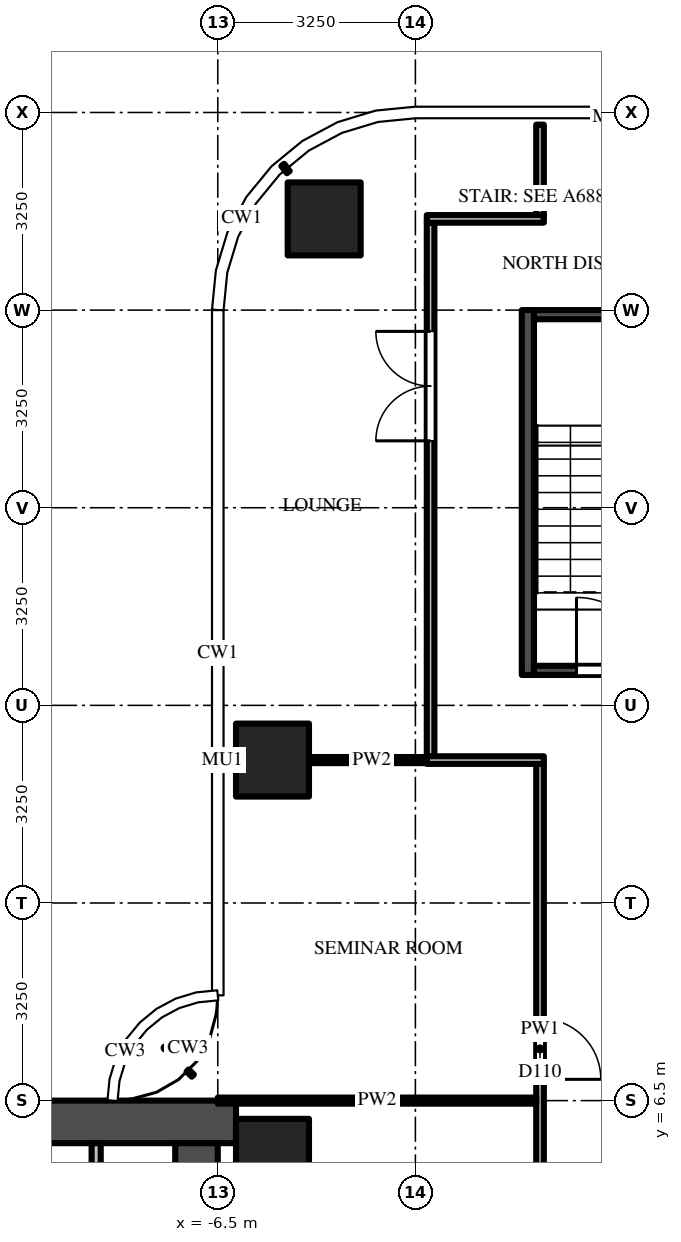
"""IFC4 building model, lengths in metres.
Left out: names, types, materials, properties, quantities, classifications, styles, units other than length and angle.
Written with IfcOpenShell. Run it as: python <this file> out.ifc"""

import sys

from ifc_helpers import new_model, si_unit, direction, frame, frame_2d, origin, origin_2d, place, context, subcontext, project, spatial, rectangle, extrude, source, transform, mapped, element, fill, save


model = new_model("IFC4")
c1 = context("Model", 3, precision=1e-05, world=origin(), true_north=direction((0.0, 1.0)))
c2 = subcontext(c1, "Body", "Model", "MODEL_VIEW")
j1 = project(units=[si_unit("LENGTHUNIT", "METRE"), si_unit("PLANEANGLEUNIT", "RADIAN")], contexts=[c1])
p1 = place(None, origin())
s1 = spatial("IfcSite", under=j1, at=p1, CompositionType="ELEMENT")
p2 = place(p1, origin())
s2 = spatial("IfcBuilding", under=s1, at=p2, CompositionType="ELEMENT")
p3 = place(p2, frame((0.0, 0.0, 197.1)))
s3 = spatial("IfcBuildingStorey", under=s2, at=p3, CompositionType="ELEMENT", Elevation=197.1)
m1 = source(origin(), c2, "Body", "SweptSolid", [
    extrude(rectangle(XDim=1.2, YDim=1.2, at=origin_2d()), origin(), (0.0, 0.0, 1.0), 3.9),
])
for number, where, z_axis, x_axis in (
    (1, (-5.6, 12.1, 0.0), (0.0, 0.0, 1.0), (1.0, 0.0, 0.0)),
    (2, (-4.75, 21.0, 0.0), (0.0, 0.0, 1.0), (1.0, 0.0, 0.0)),
    (3, (-5.6, 5.6, 0.0), (0.0, 0.0, 1.0), (1.0, 0.0, 0.0)),
):
    element("IfcColumn", number, at=place(p3, frame(where, z_axis=z_axis, x_axis=x_axis)), inside=s3, PredefinedType="COLUMN", context=c2, shape_type="MappedRepresentation", body=[
        mapped(m1, transform((0.0, 0.0, 0.0))),
    ])
m2 = source(origin(), c2, "Body", "SweptSolid", [
    extrude(rectangle(XDim=16.55, YDim=0.7, at=frame_2d((8.275, 0.0))), origin(), (0.0, 0.0, 1.0), 3.7),
])
p4 = place(p3, frame((-6.2, 6.15, 0.0), z_axis=(0.0, 0.0, 1.0), x_axis=(-1.0, 0.0, 0.0)))
e4 = element("IfcWall", 4, at=p4, inside=s3, PredefinedType="SHEAR", context=c2, shape_type="MappedRepresentation", body=[
    mapped(m2, transform((0.0, 0.0, 0.0))),
])
m3 = source(origin(), c2, "Body", "SweptSolid", [
    extrude(rectangle(XDim=9.05, YDim=0.7, at=frame_2d((4.525, 0.0))), origin(), (0.0, 0.0, 1.0), 3.7),
])
p5 = place(p3, frame((-6.85, 5.8, 0.0), z_axis=(0.0, 0.0, 1.0), x_axis=(0.0, -1.0, 0.0)))
e5 = element("IfcWall", 5, at=p5, inside=s3, PredefinedType="SHEAR", context=c2, shape_type="MappedRepresentation", body=[
    mapped(m3, transform((0.0, 0.0, 0.0))),
])
m4 = source(origin(), c2, "Body", "SweptSolid", [
    extrude(rectangle(XDim=1.8, YDim=2.1, at=frame_2d((0.9, 1.05))), frame((0.0, 0.36, 0.0), z_axis=(0.0, -1.0, 0.0), x_axis=(1.0, 0.0, 0.0)), (0.0, 0.0, 1.0), 0.72),
])
p6 = place(p5, frame((3.15, 0.0, 0.0)))
e6 = element("IfcOpeningElement", 6, at=p6, cuts=e5, PredefinedType="OPENING", context=c2, shape_type="MappedRepresentation", body=[
    mapped(m4, transform((0.0, 0.0, 0.0))),
])
m5 = source(origin(), c2, "Body", "SweptSolid", [
    extrude(rectangle(XDim=2.2, YDim=0.15, at=frame_2d((1.1, 0.0))), origin(), (0.0, 0.0, 1.0), 3.7),
])
p7 = place(p3, frame((-8.5, 5.8, 0.0), z_axis=(0.0, 0.0, 1.0), x_axis=(0.0, -1.0, 0.0)))
e7 = element("IfcWall", 7, at=p7, inside=s3, PredefinedType="PARTITIONING", context=c2, shape_type="MappedRepresentation", body=[
    mapped(m5, transform((0.0, 0.0, 0.0))),
])
m6 = source(origin(), c2, "Body", "SweptSolid", [
    extrude(rectangle(XDim=6.0, YDim=0.2, at=frame_2d((3.0, 0.0))), origin(), (0.0, 0.0, 1.0), 3.7),
])
p8 = place(p3, frame((-1.4, 13.5, 0.0), z_axis=(0.0, 0.0, 1.0), x_axis=(0.0, 1.0, 0.0)))
e8 = element("IfcWall", 8, at=p8, inside=s3, PredefinedType="SHEAR", context=c2, shape_type="MappedRepresentation", body=[
    mapped(m6, transform((0.0, 0.0, 0.0))),
])
m7 = source(origin(), c2, "Body", "SweptSolid", [
    extrude(rectangle(XDim=2.6, YDim=0.15, at=frame_2d((1.3, 0.0))), origin(), (0.0, 0.0, 1.0), 3.7),
])
p9 = place(p3, frame((-1.3, 13.575, 0.0), z_axis=(0.0, 0.0, 1.0), x_axis=(1.0, 0.0, 0.0)))
e9 = element("IfcWall", 9, at=p9, inside=s3, PredefinedType="SHEAR", context=c2, shape_type="MappedRepresentation", body=[
    mapped(m7, transform((0.0, 0.0, 0.0))),
])
m8 = source(origin(), c2, "Body", "SweptSolid", [
    extrude(rectangle(XDim=1.2, YDim=2.1, at=frame_2d((0.6, 1.05))), frame((0.0, 0.085, 0.0), z_axis=(0.0, -1.0, 0.0), x_axis=(1.0, 0.0, 0.0)), (0.0, 0.0, 1.0), 0.17),
])
p10 = place(p9, frame((0.7, 0.0, 0.0)))
e10 = element("IfcOpeningElement", 10, at=p10, cuts=e9, PredefinedType="OPENING", context=c2, shape_type="MappedRepresentation", body=[
    mapped(m8, transform((0.0, 0.0, 0.0))),
])
p11 = place(p3, frame((-1.3, 19.425, 0.0), z_axis=(0.0, 0.0, 1.0), x_axis=(1.0, 0.0, 0.0)))
e11 = element("IfcWall", 11, at=p11, inside=s3, PredefinedType="SHEAR", context=c2, shape_type="MappedRepresentation", body=[
    mapped(m7, transform((0.0, 0.0, 0.0))),
])
m9 = source(origin(), c2, "Body", "SweptSolid", [
    extrude(rectangle(XDim=8.788, YDim=0.125, at=frame_2d((4.394, 0.0))), origin(), (0.0, 0.0, 1.0), 2.78),
])
p12 = place(p3, frame((-3.0, 12.15, 0.0), z_axis=(0.0, 0.0, 1.0), x_axis=(0.0, 1.0, 0.0)))
e12 = element("IfcWall", 12, at=p12, inside=s3, PredefinedType="PARTITIONING", context=c2, shape_type="MappedRepresentation", body=[
    mapped(m9, transform((0.0, 0.0, 0.0))),
])
m10 = source(origin(), c2, "Body", "SweptSolid", [
    extrude(rectangle(XDim=1.8, YDim=2.1, at=frame_2d((0.9, 1.05))), frame((0.0, 0.073, 0.0), z_axis=(0.0, -1.0, 0.0), x_axis=(1.0, 0.0, 0.0)), (0.0, 0.0, 1.0), 0.145),
])
p13 = place(p12, frame((5.2, 0.0, 0.0)))
e13 = element("IfcOpeningElement", 13, at=p13, cuts=e12, PredefinedType="OPENING", context=c2, shape_type="MappedRepresentation", body=[
    mapped(m10, transform((0.0, 0.0, 0.0))),
])
m11 = source(origin(), c2, "Body", "SweptSolid", [
    extrude(rectangle(XDim=8.725, YDim=0.125, at=frame_2d((4.363, 0.0))), origin(), (0.0, 0.0, 1.0), 2.997),
])
p14 = place(p3, frame((-1.2, 12.038, 0.0), z_axis=(0.0, 0.0, 1.0), x_axis=(0.0, -1.0, 0.0)))
e14 = element("IfcWall", 14, at=p14, inside=s3, PredefinedType="PARTITIONING", context=c2, shape_type="MappedRepresentation", body=[
    mapped(m11, transform((0.0, 0.0, 0.0))),
])
m12 = source(origin(), c2, "Body", "SweptSolid", [
    extrude(rectangle(XDim=1.0, YDim=2.1, at=frame_2d((0.5, 1.05))), frame((0.0, 0.073, 0.0), z_axis=(0.0, -1.0, 0.0), x_axis=(1.0, 0.0, 0.0)), (0.0, 0.0, 1.0), 0.145),
])
p15 = place(p14, frame((4.188, 0.0, 0.0)))
e15 = element("IfcOpeningElement", 15, at=p15, cuts=e14, PredefinedType="OPENING", context=c2, shape_type="MappedRepresentation", body=[
    mapped(m12, transform((0.0, 0.0, 0.0))),
])
m13 = source(origin(), c2, "Body", "SweptSolid", [
    extrude(rectangle(XDim=1.488, YDim=0.125, at=frame_2d((0.744, 0.0))), origin(), (0.0, 0.0, 1.0), 2.78),
])
p16 = place(p3, frame((-1.2, 22.55, 0.0), z_axis=(0.0, 0.0, 1.0), x_axis=(0.0, -1.0, 0.0)))
e16 = element("IfcWall", 16, at=p16, inside=s3, PredefinedType="PARTITIONING", context=c2, shape_type="MappedRepresentation", body=[
    mapped(m13, transform((0.0, 0.0, 0.0))),
])
m14 = source(origin(), c2, "Body", "SweptSolid", [
    extrude(rectangle(XDim=5.238, YDim=0.1, at=frame_2d((2.619, 0.0))), origin(), (0.0, 0.0, 1.0), 2.78),
])
p17 = place(p3, frame((-6.5, 6.5, 0.0), z_axis=(0.0, 0.0, 1.0), x_axis=(1.0, 0.0, 0.0)))
e17 = element("IfcWall", 17, at=p17, inside=s3, PredefinedType="PARTITIONING", context=c2, shape_type="MappedRepresentation", body=[
    mapped(m14, transform((0.0, 0.0, 0.0))),
])
m15 = source(origin(), c2, "Body", "SweptSolid", [
    extrude(rectangle(XDim=2.062, YDim=0.1, at=frame_2d((1.031, 0.0))), origin(), (0.0, 0.0, 1.0), 2.997),
])
p18 = place(p3, frame((-5.0, 12.1, 0.0), z_axis=(0.0, 0.0, 1.0), x_axis=(1.0, 0.0, 0.0)))
e18 = element("IfcWall", 18, at=p18, inside=s3, PredefinedType="PARTITIONING", context=c2, shape_type="MappedRepresentation", body=[
    mapped(m15, transform((0.0, 0.0, 0.0))),
])
m16 = source(origin(), c2, "Body", "SweptSolid", [
    extrude(rectangle(XDim=1.925, YDim=0.125, at=frame_2d((0.962, 0.0))), origin(), (0.0, 0.0, 1.0), 2.997),
])
p19 = place(p3, frame((-1.137, 12.1, 0.0), z_axis=(0.0, 0.0, 1.0), x_axis=(-1.0, 0.0, 0.0)))
e19 = element("IfcWall", 19, at=p19, inside=s3, PredefinedType="PARTITIONING", context=c2, shape_type="MappedRepresentation", body=[
    mapped(m16, transform((0.0, 0.0, 0.0))),
])
m17 = source(origin(), c2, "Body", "SweptSolid", [
    extrude(rectangle(XDim=1.925, YDim=0.125, at=frame_2d((0.962, 0.0))), origin(), (0.0, 0.0, 1.0), 2.78),
])
p20 = place(p3, frame((-3.062, 21.0, 0.0), z_axis=(0.0, 0.0, 1.0), x_axis=(1.0, 0.0, 0.0)))
e20 = element("IfcWall", 20, at=p20, inside=s3, PredefinedType="PARTITIONING", context=c2, shape_type="MappedRepresentation", body=[
    mapped(m17, transform((0.0, 0.0, 0.0))),
])
m18 = source(origin(), c2, "Body", "SweptSolid", [
    extrude(rectangle(XDim=1.2, YDim=2.1, at=frame_2d((0.6, 1.05))), frame((0.0, 0.025, 0.0), z_axis=(0.0, -1.0, 0.0), x_axis=(1.0, 0.0, 0.0)), (0.0, 0.0, 1.0), 0.05),
])
p21 = place(p10, origin())
e21 = element("IfcDoor", 21, at=p21, inside=s3, OperationType="SINGLE_SWING_LEFT", PredefinedType="DOOR", context=c2, shape_type="MappedRepresentation", body=[
    mapped(m18, transform((0.0, 0.0, 0.0))),
])
fill(e10, e21)
m19 = source(origin(), c2, "Body", "SweptSolid", [
    extrude(rectangle(XDim=1.0, YDim=2.1, at=frame_2d((0.5, 1.05))), frame((0.0, 0.025, 0.0), z_axis=(0.0, -1.0, 0.0), x_axis=(1.0, 0.0, 0.0)), (0.0, 0.0, 1.0), 0.05),
])
p22 = place(p15, origin())
e22 = element("IfcDoor", 22, at=p22, inside=s3, OperationType="SINGLE_SWING_RIGHT", PredefinedType="DOOR", context=c2, shape_type="MappedRepresentation", body=[
    mapped(m19, transform((0.0, 0.0, 0.0))),
])
fill(e15, e22)
m20 = source(origin(), c2, "Body", "SweptSolid", [
    extrude(rectangle(XDim=1.8, YDim=2.1, at=frame_2d((0.9, 1.05))), frame((0.0, 0.025, 0.0), z_axis=(0.0, -1.0, 0.0), x_axis=(1.0, 0.0, 0.0)), (0.0, 0.0, 1.0), 0.05),
])
p23 = place(p13, origin())
e23 = element("IfcDoor", 23, at=p23, inside=s3, OperationType="DOUBLE_DOOR_SINGLE_SWING", PredefinedType="DOOR", context=c2, shape_type="MappedRepresentation", body=[
    mapped(m20, transform((0.0, 0.0, 0.0))),
])
fill(e13, e23)
save(model, sys.argv[1])
